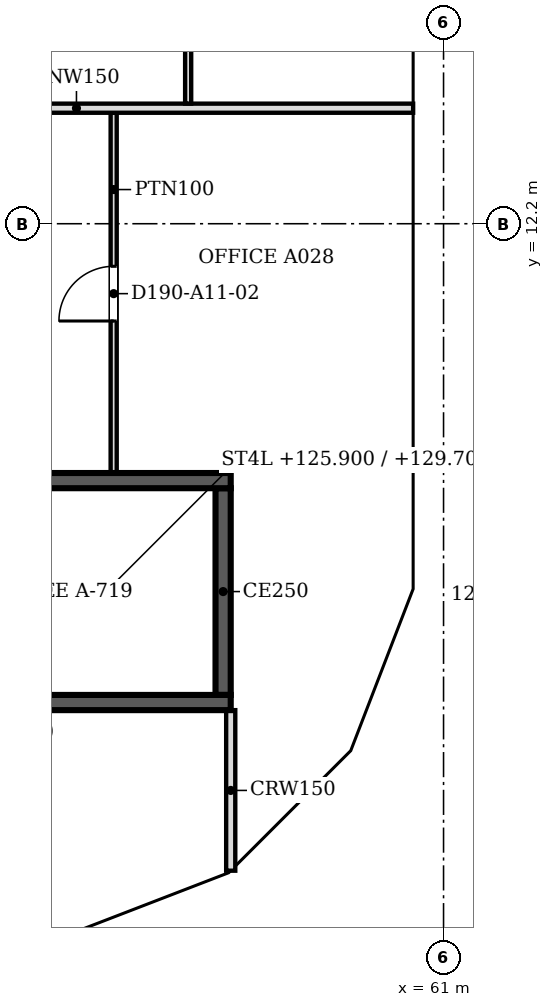
"""IFC4 building model, lengths in metres.
Left out: names, types, materials, properties, quantities, classifications, styles, units other than length and angle.
Written with IfcOpenShell. Run it as: python <this file> out.ifc"""

import sys

from ifc_helpers import new_model, si_unit, direction, frame, frame_2d, origin, place, context, subcontext, project, spatial, polyline, rectangle, outline, extrude, faceted_brep, source, transform, mapped, element, fill, save


model = new_model("IFC4")
c1 = context("Model", 3, precision=1e-05, world=origin(), true_north=direction((0.0, 1.0)))
c2 = subcontext(c1, "Body", "Model", "MODEL_VIEW")
j1 = project(units=[si_unit("LENGTHUNIT", "METRE"), si_unit("PLANEANGLEUNIT", "RADIAN")], contexts=[c1])
p1 = place(None, origin())
s1 = spatial("IfcSite", under=j1, at=p1, CompositionType="ELEMENT")
p2 = place(p1, origin())
s2 = spatial("IfcBuilding", under=s1, at=p2, CompositionType="ELEMENT")
p3 = place(p2, frame((0.0, 0.0, 124.0)))
s3 = spatial("IfcBuildingStorey", under=s2, at=p3, CompositionType="ELEMENT", Elevation=124.0)
m1 = source(origin(), c2, "Body", "Brep", [
    faceted_brep([(2.95, -0.25, 0.0), (3.003, -0.25, 0.068), (3.003, -0.25, 7.532), (2.95, -0.25, 7.6), (0.0, -0.25, 3.8), (0.047, 0.25, 3.86), (2.898, 0.25, 7.532), (2.898, 0.25, 0.068), (0.047, 0.25, 3.74), (2.95, 0.0, 0.0), (2.95, 0.0, 7.6), (0.0, 0.0, 3.8)], [[[0, 1, 2, 3, 4]], [[5, 6, 7, 8]], [[1, 0, 9]], [[10, 3, 2]], [[6, 5, 11, 4, 3, 10]], [[8, 7, 9, 0, 4, 11]], [[8, 11, 5]], [[1, 9, 7, 6, 10, 2]]]),
])
p4 = place(p3, frame((54.854, 0.25, -3.8), z_axis=(0.0, 0.0, 1.0), x_axis=(0.932970071518, 0.359953949349, 0.0)))
e1 = element("IfcWall", 1, at=p4, inside=s3, PredefinedType="SOLIDWALL", context=c2, shape_type="MappedRepresentation", body=[
    mapped(m1, transform((0.0, 0.0, 0.0), scale=1.0)),
])
m2 = source(origin(), c2, "Body", "SweptSolid", [
    extrude(outline(polyline([(2.75, 6.935), (0.316, 3.8), (2.75, 0.665), (2.75, 6.935)])), frame((0.0, 0.26, 0.0), z_axis=(0.0, -1.0, 0.0), x_axis=(1.0, 0.0, 0.0)), (0.0, 0.0, 1.0), 0.52),
])
p5 = place(p4, origin())
e2 = element("IfcOpeningElement", 2, at=p5, cuts=e1, PredefinedType="OPENING", context=c2, shape_type="MappedRepresentation", body=[
    mapped(m2, transform((0.0, 0.0, 0.0), scale=1.0)),
])
m3 = source(origin(), c2, "Body", "Brep", [
    faceted_brep([(0.053, -0.25, 0.0), (2.997, -0.25, 3.8), (0.053, -0.25, 7.6), (0.0, -0.25, 7.532), (0.0, -0.25, 0.068), (0.106, 0.25, 7.532), (2.944, 0.25, 3.868), (2.944, 0.25, 3.732), (0.106, 0.25, 0.068), (2.997, 0.0, 3.8), (0.053, 0.0, 0.0), (0.053, 0.0, 7.6)], [[[0, 1, 2, 3, 4]], [[5, 6, 7, 8]], [[8, 7, 9, 1, 0, 10]], [[6, 5, 11, 2, 1, 9]], [[3, 2, 11]], [[10, 0, 4]], [[8, 10, 4, 3, 11, 5]], [[9, 7, 6]]]),
])
p6 = place(p3, frame((57.569, 1.274, -3.8), z_axis=(0.0, 0.0, 1.0), x_axis=(0.707066050402, 0.707147509625, 0.0)))
e3 = element("IfcWall", 3, at=p6, inside=s3, PredefinedType="SOLIDWALL", context=c2, shape_type="MappedRepresentation", body=[
    mapped(m3, transform((0.0, 0.0, 0.0), scale=1.0)),
])
m4 = source(origin(), c2, "Body", "SweptSolid", [
    extrude(outline(polyline([(0.253, 0.666), (2.681, 3.8), (0.253, 6.934), (0.253, 0.666)])), frame((0.0, 0.26, 0.0), z_axis=(0.0, -1.0, 0.0), x_axis=(1.0, 0.0, 0.0)), (0.0, 0.0, 1.0), 0.52),
])
p7 = place(p6, origin())
e4 = element("IfcOpeningElement", 4, at=p7, cuts=e3, PredefinedType="OPENING", context=c2, shape_type="MappedRepresentation", body=[
    mapped(m4, transform((0.0, 0.0, 0.0), scale=1.0)),
])
m5 = source(origin(), c2, "Body", "Brep", [
    faceted_brep([(2.95, -0.25, 0.0), (2.997, -0.25, 0.059), (2.997, -0.25, 7.541), (2.95, -0.25, 7.6), (0.0, -0.25, 3.8), (0.053, 0.25, 3.868), (2.904, 0.25, 7.54), (2.904, 0.25, 0.06), (0.053, 0.25, 3.732), (2.95, 0.0, 0.0), (2.95, 0.0, 7.6), (0.0, 0.0, 3.8)], [[[0, 1, 2, 3, 4]], [[5, 6, 7, 8]], [[1, 0, 9]], [[10, 3, 2]], [[6, 5, 11, 4, 3, 10]], [[8, 7, 9, 0, 4, 11]], [[8, 11, 5]], [[1, 9, 7, 6, 10, 2]]]),
])
p8 = place(p3, frame((59.688, 3.394, -3.8), z_axis=(0.0, 0.0, 1.0), x_axis=(0.359972353723, 0.932962970624, 0.0)))
e5 = element("IfcWall", 5, at=p8, inside=s3, PredefinedType="SOLIDWALL", context=c2, shape_type="MappedRepresentation", body=[
    mapped(m5, transform((0.0, 0.0, 0.0), scale=1.0)),
])
p9 = place(p8, origin())
e6 = element("IfcOpeningElement", 6, at=p9, cuts=e5, PredefinedType="OPENING", context=c2, shape_type="MappedRepresentation", body=[
    mapped(m2, transform((0.0, 0.0, 0.0), scale=1.0)),
])
m6 = source(origin(), c2, "Body", "Brep", [
    faceted_brep([(0.047, -0.25, 0.0), (3.05, -0.25, 3.8), (0.047, -0.25, 7.6), (0.0, -0.25, 7.54), (0.0, -0.25, 0.06), (0.093, 0.25, 7.541), (3.05, 0.25, 3.8), (0.093, 0.25, 0.059), (0.047, 0.0, 0.0), (0.047, 0.0, 7.6)], [[[0, 1, 2, 3, 4]], [[5, 6, 7]], [[7, 6, 1, 0, 8]], [[6, 5, 9, 2, 1]], [[3, 2, 9]], [[8, 0, 4]], [[7, 8, 4, 3, 9, 5]]]),
])
p10 = place(p3, frame((60.75, 6.1, -3.8), z_axis=(0.0, 0.0, 1.0), x_axis=(0.0, 1.0, 0.0)))
e7 = element("IfcWall", 7, at=p10, inside=s3, PredefinedType="SOLIDWALL", context=c2, shape_type="MappedRepresentation", body=[
    mapped(m6, transform((0.0, 0.0, 0.0), scale=1.0)),
])
m7 = source(origin(), c2, "Body", "SweptSolid", [
    extrude(outline(polyline([(0.247, 0.656), (2.731, 3.8), (0.247, 6.944), (0.247, 0.656)])), frame((0.0, 0.26, 0.0), z_axis=(0.0, -1.0, 0.0), x_axis=(1.0, 0.0, 0.0)), (0.0, 0.0, 1.0), 0.52),
])
p11 = place(p10, origin())
e8 = element("IfcOpeningElement", 8, at=p11, cuts=e7, PredefinedType="OPENING", context=c2, shape_type="MappedRepresentation", body=[
    mapped(m7, transform((0.0, 0.0, 0.0), scale=1.0)),
])
m8 = source(origin(), c2, "Body", "SweptSolid", [
    extrude(outline(polyline([(3.05, 0.0), (6.1, 3.8), (3.05, 7.6), (0.0, 3.8), (3.05, 0.0)])), frame((0.0, 0.25, 0.0), z_axis=(0.0, -1.0, 0.0), x_axis=(1.0, 0.0, 0.0)), (0.0, 0.0, 1.0), 0.5),
])
p12 = place(p3, frame((60.75, 9.15, -3.8), z_axis=(0.0, 0.0, 1.0), x_axis=(0.0, 1.0, 0.0)))
e9 = element("IfcWall", 9, at=p12, inside=s3, PredefinedType="SOLIDWALL", context=c2, shape_type="MappedRepresentation", body=[
    mapped(m8, transform((0.0, 0.0, 0.0), scale=1.0)),
])
m9 = source(origin(), c2, "Body", "SweptSolid", [
    extrude(outline(polyline([(3.05, 0.399), (5.78, 3.8), (3.05, 7.201), (0.321, 3.8), (3.05, 0.399)])), frame((0.0, 0.26, 0.0), z_axis=(0.0, -1.0, 0.0), x_axis=(1.0, 0.0, 0.0)), (0.0, 0.0, 1.0), 0.52),
])
p13 = place(p12, origin())
e10 = element("IfcOpeningElement", 10, at=p13, cuts=e9, PredefinedType="OPENING", context=c2, shape_type="MappedRepresentation", body=[
    mapped(m9, transform((0.0, 0.0, 0.0), scale=1.0)),
])
p14 = place(p2, frame((0.0, 0.0, 127.8)))
s4 = spatial("IfcBuildingStorey", under=s2, at=p14, CompositionType="ELEMENT", Elevation=127.8)
m10 = source(origin(), c2, "Body", "Brep", [
    faceted_brep([(0.047, -0.25, 0.0), (2.997, -0.25, 3.8), (0.047, -0.25, 7.6), (0.0, -0.25, 7.541), (0.0, -0.25, 0.059), (0.093, 0.25, 7.54), (2.944, 0.25, 3.868), (2.944, 0.25, 3.732), (0.093, 0.25, 0.06), (2.997, 0.0, 3.8), (0.047, 0.0, 0.0), (0.047, 0.0, 7.6)], [[[0, 1, 2, 3, 4]], [[5, 6, 7, 8]], [[8, 7, 9, 1, 0, 10]], [[6, 5, 11, 2, 1, 9]], [[3, 2, 11]], [[10, 0, 4]], [[8, 10, 4, 3, 11, 5]], [[9, 7, 6]]]),
])
p15 = place(p14, frame((54.81, 0.233, -3.8), z_axis=(0.0, 0.0, 1.0), x_axis=(0.932990326376, 0.359901446078, 0.0)))
e11 = element("IfcWall", 11, at=p15, inside=s4, PredefinedType="SOLIDWALL", context=c2, shape_type="MappedRepresentation", body=[
    mapped(m10, transform((0.0, 0.0, 0.0), scale=1.0)),
])
m11 = source(origin(), c2, "Body", "SweptSolid", [
    extrude(outline(polyline([(0.247, 0.665), (2.681, 3.8), (0.247, 6.935), (0.247, 0.665)])), frame((0.0, 0.26, 0.0), z_axis=(0.0, -1.0, 0.0), x_axis=(1.0, 0.0, 0.0)), (0.0, 0.0, 1.0), 0.52),
])
p16 = place(p15, origin())
e12 = element("IfcOpeningElement", 12, at=p16, cuts=e11, PredefinedType="OPENING", context=c2, shape_type="MappedRepresentation", body=[
    mapped(m11, transform((0.0, 0.0, 0.0), scale=1.0)),
])
m12 = source(origin(), c2, "Body", "Brep", [
    faceted_brep([(2.944, -0.25, 0.0), (2.997, -0.25, 0.068), (2.997, -0.25, 7.532), (2.944, -0.25, 7.6), (0.0, -0.25, 3.8), (0.053, 0.25, 3.868), (2.891, 0.25, 7.532), (2.891, 0.25, 0.068), (0.053, 0.25, 3.732), (2.944, 0.0, 0.0), (2.944, 0.0, 7.6), (0.0, 0.0, 3.8)], [[[0, 1, 2, 3, 4]], [[5, 6, 7, 8]], [[1, 0, 9]], [[10, 3, 2]], [[6, 5, 11, 4, 3, 10]], [[8, 7, 9, 0, 4, 11]], [[8, 11, 5]], [[1, 9, 7, 6, 10, 2]]]),
])
p17 = place(p14, frame((57.606, 1.312, -3.8), z_axis=(0.0, 0.0, 1.0), x_axis=(0.707147509625, 0.707066050402, 0.0)))
e13 = element("IfcWall", 13, at=p17, inside=s4, PredefinedType="SOLIDWALL", context=c2, shape_type="MappedRepresentation", body=[
    mapped(m12, transform((0.0, 0.0, 0.0), scale=1.0)),
])
m13 = source(origin(), c2, "Body", "SweptSolid", [
    extrude(outline(polyline([(2.744, 6.934), (0.316, 3.8), (2.744, 0.666), (2.744, 6.934)])), frame((0.0, 0.26, 0.0), z_axis=(0.0, -1.0, 0.0), x_axis=(1.0, 0.0, 0.0)), (0.0, 0.0, 1.0), 0.52),
])
p18 = place(p17, origin())
e14 = element("IfcOpeningElement", 14, at=p18, cuts=e13, PredefinedType="OPENING", context=c2, shape_type="MappedRepresentation", body=[
    mapped(m13, transform((0.0, 0.0, 0.0), scale=1.0)),
])
m14 = source(origin(), c2, "Body", "Brep", [
    faceted_brep([(0.053, -0.25, 0.0), (3.003, -0.25, 3.8), (0.053, -0.25, 7.6), (0.0, -0.25, 7.532), (0.0, -0.25, 0.068), (0.106, 0.25, 7.532), (2.957, 0.25, 3.86), (2.957, 0.25, 3.74), (0.106, 0.25, 0.068), (3.003, 0.0, 3.8), (0.053, 0.0, 0.0), (0.053, 0.0, 7.6)], [[[0, 1, 2, 3, 4]], [[5, 6, 7, 8]], [[8, 7, 9, 1, 0, 10]], [[6, 5, 11, 2, 1, 9]], [[3, 2, 11]], [[10, 0, 4]], [[8, 10, 4, 3, 11, 5]], [[9, 7, 6]]]),
])
p19 = place(p14, frame((59.669, 3.344, -3.8), z_axis=(0.0, 0.0, 1.0), x_axis=(0.35992665181, 0.932980602862, 0.0)))
e15 = element("IfcWall", 15, at=p19, inside=s4, PredefinedType="SOLIDWALL", context=c2, shape_type="MappedRepresentation", body=[
    mapped(m14, transform((0.0, 0.0, 0.0), scale=1.0)),
])
m15 = source(origin(), c2, "Body", "SweptSolid", [
    extrude(outline(polyline([(0.253, 0.665), (2.687, 3.8), (0.253, 6.935), (0.253, 0.665)])), frame((0.0, 0.26, 0.0), z_axis=(0.0, -1.0, 0.0), x_axis=(1.0, 0.0, 0.0)), (0.0, 0.0, 1.0), 0.52),
])
p20 = place(p19, origin())
e16 = element("IfcOpeningElement", 16, at=p20, cuts=e15, PredefinedType="OPENING", context=c2, shape_type="MappedRepresentation", body=[
    mapped(m15, transform((0.0, 0.0, 0.0), scale=1.0)),
])
m16 = source(origin(), c2, "Body", "Brep", [
    faceted_brep([(3.003, -0.25, 0.0), (6.053, -0.25, 3.8), (3.003, -0.25, 7.6), (0.0, -0.25, 3.8), (0.047, 0.25, 3.859), (3.003, 0.25, 7.6), (6.053, 0.25, 3.8), (3.003, 0.25, 0.0), (0.047, 0.25, 3.741), (0.0, 0.0, 3.8)], [[[0, 1, 2, 3]], [[4, 5, 6, 7, 8]], [[7, 6, 1, 0]], [[6, 5, 2, 1]], [[5, 4, 9, 3, 2]], [[8, 7, 0, 3, 9]], [[8, 9, 4]]]),
])
p21 = place(p14, frame((60.75, 6.146, -3.8), z_axis=(0.0, 0.0, 1.0), x_axis=(0.0, 1.0, 0.0)))
e17 = element("IfcWall", 17, at=p21, inside=s4, PredefinedType="SOLIDWALL", context=c2, shape_type="MappedRepresentation", body=[
    mapped(m16, transform((0.0, 0.0, 0.0), scale=1.0)),
])
m17 = source(origin(), c2, "Body", "SweptSolid", [
    extrude(outline(polyline([(3.005, 0.401), (5.733, 3.8), (3.005, 7.199), (0.319, 3.8), (3.005, 0.401)])), frame((0.0, 0.26, 0.0), z_axis=(0.0, -1.0, 0.0), x_axis=(1.0, 0.0, 0.0)), (0.0, 0.0, 1.0), 0.52),
])
p22 = place(p21, origin())
e18 = element("IfcOpeningElement", 18, at=p22, cuts=e17, PredefinedType="OPENING", context=c2, shape_type="MappedRepresentation", body=[
    mapped(m17, transform((0.0, 0.0, 0.0), scale=1.0)),
])
p23 = place(p14, frame((60.75, 12.2, -3.8), z_axis=(0.0, 0.0, 1.0), x_axis=(0.0, 1.0, 0.0)))
e19 = element("IfcWall", 19, at=p23, inside=s4, PredefinedType="SOLIDWALL", context=c2, shape_type="MappedRepresentation", body=[
    mapped(m8, transform((0.0, 0.0, 0.0), scale=1.0)),
])
p24 = place(p23, origin())
e20 = element("IfcOpeningElement", 20, at=p24, cuts=e19, PredefinedType="OPENING", context=c2, shape_type="MappedRepresentation", body=[
    mapped(m9, transform((0.0, 0.0, 0.0), scale=1.0)),
])
p25 = place(p3, frame((57.5, 4.325, 0.0), z_axis=(0.0, 0.0, 1.0), x_axis=(-1.0, 0.0, 0.0)))
e21 = element("IfcWall", 21, at=p25, inside=s3, PredefinedType="SOLIDWALL", context=c2, shape_type="SweptSolid", body=[
    extrude(rectangle(XDim=8.5, YDim=0.25, at=frame_2d((4.25, 0.0))), origin(), (0.0, 0.0, 1.0), 3.8),
])
m18 = source(origin(), c2, "Body", "SweptSolid", [
    extrude(rectangle(XDim=1.2, YDim=2.1, at=frame_2d((0.6, 1.05))), frame((0.0, 0.135, 0.0), z_axis=(0.0, -1.0, 0.0), x_axis=(1.0, 0.0, 0.0)), (0.0, 0.0, 1.0), 0.27),
])
p26 = place(p25, frame((6.9, 0.0, 0.0)))
e22 = element("IfcOpeningElement", 22, at=p26, cuts=e21, PredefinedType="OPENING", context=c2, shape_type="MappedRepresentation", body=[
    mapped(m18, transform((0.0, 0.0, 0.0), scale=1.0)),
])
p27 = place(p3, frame((49.0, 7.975, 0.0), z_axis=(0.0, 0.0, 1.0), x_axis=(1.0, 0.0, 0.0)))
e23 = element("IfcWall", 23, at=p27, inside=s3, PredefinedType="SOLIDWALL", context=c2, shape_type="SweptSolid", body=[
    extrude(rectangle(XDim=8.5, YDim=0.25, at=frame_2d((4.25, 0.0))), origin(), (0.0, 0.0, 1.0), 3.8),
])
p28 = place(p3, frame((57.375, 7.85, 0.0), z_axis=(0.0, 0.0, 1.0), x_axis=(0.0, -1.0, 0.0)))
e24 = element("IfcWall", 24, at=p28, inside=s3, PredefinedType="SOLIDWALL", context=c2, shape_type="SweptSolid", body=[
    extrude(rectangle(XDim=3.4, YDim=0.25, at=frame_2d((1.7, 0.0))), origin(), (0.0, 0.0, 1.0), 3.8),
])
p29 = place(p3, frame((57.5, 1.559, 0.0), z_axis=(0.0, 0.0, 1.0), x_axis=(0.0, 1.0, 0.0)))
e25 = element("IfcWall", 25, at=p29, inside=s3, PredefinedType="PARTITIONING", context=c2, shape_type="SweptSolid", body=[
    extrude(rectangle(XDim=2.641, YDim=0.15, at=frame_2d((1.32, 0.0))), origin(), (0.0, 0.0, 1.0), 3.067),
])
p30 = place(p3, frame((55.575, 14.024, 0.0), z_axis=(0.0, 0.0, 1.0), x_axis=(0.0, -1.0, 0.0)))
e26 = element("IfcWall", 26, at=p30, inside=s3, PredefinedType="PARTITIONING", context=c2, shape_type="SweptSolid", body=[
    extrude(rectangle(XDim=5.924, YDim=0.1, at=frame_2d((2.962, 0.0))), origin(), (0.0, 0.0, 1.0), 3.067),
])
m19 = source(origin(), c2, "Body", "SweptSolid", [
    extrude(rectangle(XDim=0.9, YDim=2.1, at=frame_2d((0.45, 1.05))), frame((0.0, 0.06, 0.0), z_axis=(0.0, -1.0, 0.0), x_axis=(1.0, 0.0, 0.0)), (0.0, 0.0, 1.0), 0.12),
])
p31 = place(p30, frame((2.524, 0.0, 0.0)))
e27 = element("IfcOpeningElement", 27, at=p31, cuts=e26, PredefinedType="OPENING", context=c2, shape_type="MappedRepresentation", body=[
    mapped(m19, transform((0.0, 0.0, 0.0), scale=1.0)),
])
p32 = place(p3, frame((49.426, 14.1, 0.0), z_axis=(0.0, 0.0, 1.0), x_axis=(1.0, 0.0, 0.0)))
e28 = element("IfcWall", 28, at=p32, inside=s3, PredefinedType="PARTITIONING", context=c2, shape_type="SweptSolid", body=[
    extrude(rectangle(XDim=11.074, YDim=0.15, at=frame_2d((5.537, 0.0))), origin(), (0.0, 0.0, 1.0), 3.067),
])
p33 = place(p3, frame((56.8, 21.924, 0.0), z_axis=(0.0, 0.0, 1.0), x_axis=(0.0, -1.0, 0.0)))
e29 = element("IfcWall", 29, at=p33, inside=s3, PredefinedType="PARTITIONING", context=c2, shape_type="SweptSolid", body=[
    extrude(rectangle(XDim=7.748, YDim=0.1, at=frame_2d((3.874, 0.0))), origin(), (0.0, 0.0, 1.0), 3.067),
])
p34 = place(p33, frame((3.448, 0.0, 0.0)))
e30 = element("IfcOpeningElement", 30, at=p34, cuts=e29, PredefinedType="OPENING", context=c2, shape_type="MappedRepresentation", body=[
    mapped(m19, transform((0.0, 0.0, 0.0), scale=1.0)),
])
m20 = source(origin(), c2, "Body", "SweptSolid", [
    extrude(rectangle(XDim=0.9, YDim=2.1, at=frame_2d((0.45, 1.05))), frame((0.0, 0.025, 0.0), z_axis=(0.0, -1.0, 0.0), x_axis=(1.0, 0.0, 0.0)), (0.0, 0.0, 1.0), 0.05),
])
p35 = place(p31, origin())
e31 = element("IfcDoor", 31, at=p35, inside=s3, OperationType="SINGLE_SWING_RIGHT", PredefinedType="DOOR", context=c2, shape_type="MappedRepresentation", body=[
    mapped(m20, transform((0.0, 0.0, 0.0), scale=1.0)),
])
fill(e27, e31)
save(model, sys.argv[1])
